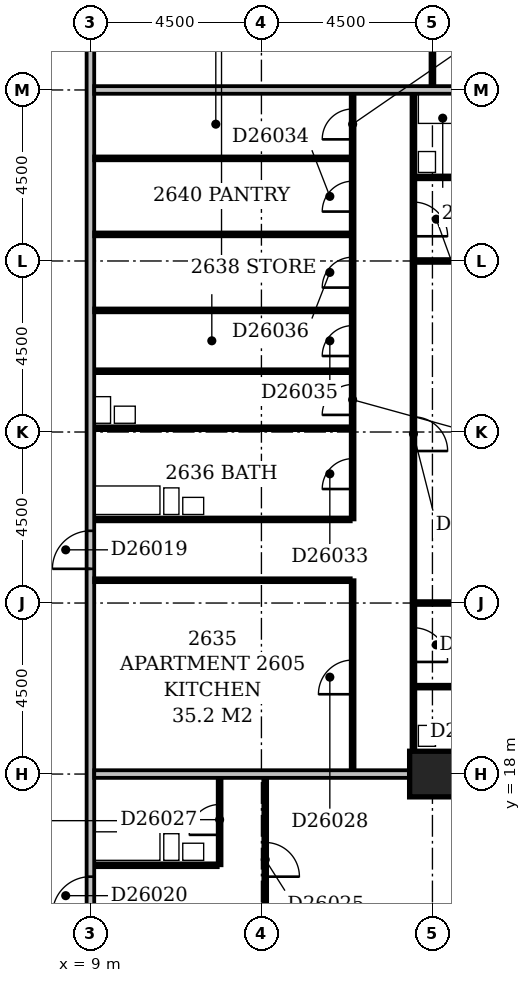
"""IFC4 building model, lengths in metres.
Left out: names, types, materials, properties, quantities, classifications, styles, units other than length and angle.
Written with IfcOpenShell. Run it as: python <this file> out.ifc"""

import sys

from ifc_helpers import new_model, si_unit, direction, frame, frame_2d, origin, origin_2d, place, context, subcontext, project, spatial, rectangle, extrude, element, fill, save


model = new_model("IFC4")
c1 = context("Model", 3, precision=1e-05, world=origin(), true_north=direction((0.0, 1.0)))
c2 = subcontext(c1, "Body", "Model", "MODEL_VIEW")
j1 = project(units=[si_unit("LENGTHUNIT", "METRE"), si_unit("PLANEANGLEUNIT", "RADIAN")], contexts=[c1])
p1 = place(None, origin())
s1 = spatial("IfcSite", under=j1, at=p1, CompositionType="ELEMENT")
p2 = place(p1, origin())
s2 = spatial("IfcBuilding", under=s1, at=p2, CompositionType="ELEMENT")
p3 = place(p2, frame((0.0, 0.0, 104.6)))
s3 = spatial("IfcBuildingStorey", under=s2, at=p3, CompositionType="ELEMENT", Elevation=104.6)
p4 = place(p3, frame((18.0, 18.0, -0.3), z_axis=(0.0, 0.0, 1.0), x_axis=(1.0, 0.0, 0.0)))
e1 = element("IfcColumn", 1, at=p4, inside=s3, PredefinedType="COLUMN", context=c2, shape_type="SweptSolid", body=[
    extrude(rectangle(XDim=1.2, YDim=1.2, at=origin_2d()), origin(), (0.0, 0.0, 1.0), 3.45),
])
p5 = place(p3, frame((9.0, 5.0, 0.0), z_axis=(0.0, 0.0, 1.0), x_axis=(0.0, 1.0, 0.0)))
e2 = element("IfcWall", 2, at=p5, inside=s3, PredefinedType="PARTITIONING", context=c2, shape_type="SweptSolid", body=[
    extrude(rectangle(XDim=44.5, YDim=0.2, at=frame_2d((22.25, 0.0))), origin(), (0.0, 0.0, 1.0), 3.15),
])
p6 = place(p5, frame((18.4, 0.0, 0.0)))
e3 = element("IfcOpeningElement", 3, at=p6, cuts=e2, PredefinedType="OPENING", context=c2, shape_type="SweptSolid", body=[
    extrude(rectangle(XDim=1.0, YDim=2.1, at=frame_2d((0.5, 1.05))), frame((0.0, 0.112, 0.0), z_axis=(0.0, -1.0, 0.0), x_axis=(1.0, 0.0, 0.0)), (0.0, 0.0, 1.0), 0.224),
])
p7 = place(p5, frame((9.3, 0.0, 0.0)))
e4 = element("IfcOpeningElement", 4, at=p7, cuts=e2, PredefinedType="OPENING", context=c2, shape_type="SweptSolid", body=[
    extrude(rectangle(XDim=1.0, YDim=2.1, at=frame_2d((0.5, 1.05))), frame((0.0, 0.112, 0.0), z_axis=(0.0, -1.0, 0.0), x_axis=(1.0, 0.0, 0.0)), (0.0, 0.0, 1.0), 0.224),
])
p8 = place(p5, frame((37.25, 0.0, 0.0)))
e5 = element("IfcOpeningElement", 5, at=p8, cuts=e2, PredefinedType="OPENING", context=c2, shape_type="SweptSolid", body=[
    extrude(rectangle(XDim=0.9, YDim=2.1, at=frame_2d((0.45, 1.05))), frame((0.0, 0.112, 0.0), z_axis=(0.0, -1.0, 0.0), x_axis=(1.0, 0.0, 0.0)), (0.0, 0.0, 1.0), 0.224),
])
p9 = place(p5, frame((1.5, 0.0, 0.0)))
e6 = element("IfcOpeningElement", 6, at=p9, cuts=e2, PredefinedType="OPENING", context=c2, shape_type="SweptSolid", body=[
    extrude(rectangle(XDim=0.9, YDim=2.1, at=frame_2d((0.45, 1.05))), frame((0.0, 0.112, 0.0), z_axis=(0.0, -1.0, 0.0), x_axis=(1.0, 0.0, 0.0)), (0.0, 0.0, 1.0), 0.224),
])
p10 = place(p3, frame((13.6, 9.6, 0.0), z_axis=(0.0, 0.0, 1.0), x_axis=(0.0, 1.0, 0.0)))
e7 = element("IfcWall", 7, at=p10, inside=s3, PredefinedType="PARTITIONING", context=c2, shape_type="SweptSolid", body=[
    extrude(rectangle(XDim=8.3, YDim=0.1, at=frame_2d((4.15, 0.0))), origin(), (0.0, 0.0, 1.0), 3.15),
])
p11 = place(p10, frame((1.2, 0.0, 0.0)))
e8 = element("IfcOpeningElement", 8, at=p11, cuts=e7, PredefinedType="OPENING", context=c2, shape_type="SweptSolid", body=[
    extrude(rectangle(XDim=0.9, YDim=2.1, at=frame_2d((0.45, 1.05))), frame((0.0, 0.062, 0.0), z_axis=(0.0, -1.0, 0.0), x_axis=(1.0, 0.0, 0.0)), (0.0, 0.0, 1.0), 0.124),
])
p12 = place(p10, frame((5.7, 0.0, 0.0)))
e9 = element("IfcOpeningElement", 9, at=p12, cuts=e7, PredefinedType="OPENING", context=c2, shape_type="SweptSolid", body=[
    extrude(rectangle(XDim=0.9, YDim=2.1, at=frame_2d((0.45, 1.05))), frame((0.0, 0.062, 0.0), z_axis=(0.0, -1.0, 0.0), x_axis=(1.0, 0.0, 0.0)), (0.0, 0.0, 1.0), 0.124),
])
p13 = place(p3, frame((9.1, 15.6, 0.0), z_axis=(0.0, 0.0, 1.0), x_axis=(1.0, 0.0, 0.0)))
e10 = element("IfcWall", 10, at=p13, inside=s3, PredefinedType="PLUMBINGWALL", context=c2, shape_type="SweptSolid", body=[
    extrude(rectangle(XDim=3.25, YDim=0.1, at=frame_2d((1.625, 0.0))), origin(), (0.0, 0.0, 1.0), 3.15),
])
p14 = place(p3, frame((12.4, 15.6, 0.0), z_axis=(0.0, 0.0, 1.0), x_axis=(0.0, 1.0, 0.0)))
e11 = element("IfcWall", 11, at=p14, inside=s3, PredefinedType="PARTITIONING", context=c2, shape_type="SweptSolid", body=[
    extrude(rectangle(XDim=2.3, YDim=0.1, at=frame_2d((1.15, 0.0))), origin(), (0.0, 0.0, 1.0), 3.15),
])
p15 = place(p14, frame((0.8, 0.0, 0.0)))
e12 = element("IfcOpeningElement", 12, at=p15, cuts=e11, PredefinedType="OPENING", context=c2, shape_type="SweptSolid", body=[
    extrude(rectangle(XDim=0.8, YDim=2.1, at=frame_2d((0.4, 1.05))), frame((0.0, 0.062, 0.0), z_axis=(0.0, -1.0, 0.0), x_axis=(1.0, 0.0, 0.0)), (0.0, 0.0, 1.0), 0.124),
])
p16 = place(p3, frame((9.1, 18.0, 0.0), z_axis=(0.0, 0.0, 1.0), x_axis=(1.0, 0.0, 0.0)))
e13 = element("IfcWall", 13, at=p16, inside=s3, PredefinedType="PARTITIONING", context=c2, shape_type="SweptSolid", body=[
    extrude(rectangle(XDim=8.3, YDim=0.2, at=frame_2d((4.15, 0.0))), origin(), (0.0, 0.0, 1.0), 2.45),
])
p17 = place(p3, frame((15.9, 18.1, 0.0), z_axis=(0.0, 0.0, 1.0), x_axis=(0.0, 1.0, 0.0)))
e14 = element("IfcWall", 14, at=p17, inside=s3, PredefinedType="PARTITIONING", context=c2, shape_type="SweptSolid", body=[
    extrude(rectangle(XDim=5.0, YDim=0.1, at=frame_2d((2.5, 0.0))), origin(), (0.0, 0.0, 1.0), 3.15),
])
p18 = place(p17, frame((2.0, 0.0, 0.0)))
e15 = element("IfcOpeningElement", 15, at=p18, cuts=e14, PredefinedType="OPENING", context=c2, shape_type="SweptSolid", body=[
    extrude(rectangle(XDim=0.9, YDim=2.1, at=frame_2d((0.45, 1.05))), frame((0.0, 0.062, 0.0), z_axis=(0.0, -1.0, 0.0), x_axis=(1.0, 0.0, 0.0)), (0.0, 0.0, 1.0), 0.124),
])
p19 = place(p3, frame((17.5, 18.1, 0.0), z_axis=(0.0, 0.0, 1.0), x_axis=(0.0, 1.0, 0.0)))
e16 = element("IfcWall", 16, at=p19, inside=s3, PredefinedType="PARTITIONING", context=c2, shape_type="SweptSolid", body=[
    extrude(rectangle(XDim=17.8, YDim=0.1, at=frame_2d((8.9, 0.0))), origin(), (0.0, 0.0, 1.0), 3.15),
])
p20 = place(p19, frame((2.85, 0.0, 0.0)))
e17 = element("IfcOpeningElement", 17, at=p20, cuts=e16, PredefinedType="OPENING", context=c2, shape_type="SweptSolid", body=[
    extrude(rectangle(XDim=0.9, YDim=2.1, at=frame_2d((0.45, 1.05))), frame((0.0, 0.062, 0.0), z_axis=(0.0, -1.0, 0.0), x_axis=(1.0, 0.0, 0.0)), (0.0, 0.0, 1.0), 0.124),
])
p21 = place(p19, frame((8.4, 0.0, 0.0)))
e18 = element("IfcOpeningElement", 18, at=p21, cuts=e16, PredefinedType="OPENING", context=c2, shape_type="SweptSolid", body=[
    extrude(rectangle(XDim=0.9, YDim=2.1, at=frame_2d((0.45, 1.05))), frame((0.0, 0.062, 0.0), z_axis=(0.0, -1.0, 0.0), x_axis=(1.0, 0.0, 0.0)), (0.0, 0.0, 1.0), 0.124),
])
p22 = place(p19, frame((14.05, 0.0, 0.0)))
e19 = element("IfcOpeningElement", 19, at=p22, cuts=e16, PredefinedType="OPENING", context=c2, shape_type="SweptSolid", body=[
    extrude(rectangle(XDim=0.9, YDim=2.1, at=frame_2d((0.45, 1.05))), frame((0.0, 0.062, 0.0), z_axis=(0.0, -1.0, 0.0), x_axis=(1.0, 0.0, 0.0)), (0.0, 0.0, 1.0), 0.124),
])
p23 = place(p3, frame((17.55, 20.3, 0.0), z_axis=(0.0, 0.0, 1.0), x_axis=(1.0, 0.0, 0.0)))
e20 = element("IfcWall", 20, at=p23, inside=s3, PredefinedType="PLUMBINGWALL", context=c2, shape_type="SweptSolid", body=[
    extrude(rectangle(XDim=4.0, YDim=0.1, at=frame_2d((2.0, 0.0))), origin(), (0.0, 0.0, 1.0), 3.15),
])
p24 = place(p23, frame((1.0, 0.0, 0.0)))
e21 = element("IfcOpeningElement", 21, at=p24, cuts=e20, PredefinedType="OPENING", context=c2, shape_type="SweptSolid", body=[
    extrude(rectangle(XDim=0.8, YDim=2.1, at=frame_2d((0.4, 1.05))), frame((0.0, 0.062, 0.0), z_axis=(0.0, -1.0, 0.0), x_axis=(1.0, 0.0, 0.0)), (0.0, 0.0, 1.0), 0.124),
])
p25 = place(p3, frame((17.55, 22.5, 0.0), z_axis=(0.0, 0.0, 1.0), x_axis=(1.0, 0.0, 0.0)))
e22 = element("IfcWall", 22, at=p25, inside=s3, PredefinedType="PARTITIONING", context=c2, shape_type="SweptSolid", body=[
    extrude(rectangle(XDim=4.35, YDim=0.1, at=frame_2d((2.175, 0.0))), origin(), (0.0, 0.0, 1.0), 3.15),
])
p26 = place(p3, frame((9.1, 23.1, 0.0), z_axis=(0.0, 0.0, 1.0), x_axis=(1.0, 0.0, 0.0)))
e23 = element("IfcWall", 23, at=p26, inside=s3, PredefinedType="PARTITIONING", context=c2, shape_type="SweptSolid", body=[
    extrude(rectangle(XDim=6.75, YDim=0.1, at=frame_2d((3.375, 0.0))), origin(), (0.0, 0.0, 1.0), 3.15),
])
p27 = place(p3, frame((9.1, 24.7, 0.0), z_axis=(0.0, 0.0, 1.0), x_axis=(1.0, 0.0, 0.0)))
e24 = element("IfcWall", 24, at=p27, inside=s3, PredefinedType="PLUMBINGWALL", context=c2, shape_type="SweptSolid", body=[
    extrude(rectangle(XDim=6.75, YDim=0.1, at=frame_2d((3.375, 0.0))), origin(), (0.0, 0.0, 1.0), 3.15),
])
p28 = place(p3, frame((15.9, 24.7, 0.0), z_axis=(0.0, 0.0, 1.0), x_axis=(0.0, 1.0, 0.0)))
e25 = element("IfcWall", 25, at=p28, inside=s3, PredefinedType="PARTITIONING", context=c2, shape_type="SweptSolid", body=[
    extrude(rectangle(XDim=11.2, YDim=0.1, at=frame_2d((5.6, 0.0))), origin(), (0.0, 0.0, 1.0), 3.15),
])
p29 = place(p28, frame((0.8, 0.0, 0.0)))
e26 = element("IfcOpeningElement", 26, at=p29, cuts=e25, PredefinedType="OPENING", context=c2, shape_type="SweptSolid", body=[
    extrude(rectangle(XDim=0.8, YDim=2.1, at=frame_2d((0.4, 1.05))), frame((0.0, 0.062, 0.0), z_axis=(0.0, -1.0, 0.0), x_axis=(1.0, 0.0, 0.0)), (0.0, 0.0, 1.0), 0.124),
])
p30 = place(p28, frame((8.1, 0.0, 0.0)))
e27 = element("IfcOpeningElement", 27, at=p30, cuts=e25, PredefinedType="OPENING", context=c2, shape_type="SweptSolid", body=[
    extrude(rectangle(XDim=0.8, YDim=2.1, at=frame_2d((0.4, 1.05))), frame((0.0, 0.062, 0.0), z_axis=(0.0, -1.0, 0.0), x_axis=(1.0, 0.0, 0.0)), (0.0, 0.0, 1.0), 0.124),
])
p31 = place(p28, frame((4.3, 0.0, 0.0)))
e28 = element("IfcOpeningElement", 28, at=p31, cuts=e25, PredefinedType="OPENING", context=c2, shape_type="SweptSolid", body=[
    extrude(rectangle(XDim=0.8, YDim=2.1, at=frame_2d((0.4, 1.05))), frame((0.0, 0.062, 0.0), z_axis=(0.0, -1.0, 0.0), x_axis=(1.0, 0.0, 0.0)), (0.0, 0.0, 1.0), 0.124),
])
p32 = place(p28, frame((6.1, 0.0, 0.0)))
e29 = element("IfcOpeningElement", 29, at=p32, cuts=e25, PredefinedType="OPENING", context=c2, shape_type="SweptSolid", body=[
    extrude(rectangle(XDim=0.8, YDim=2.1, at=frame_2d((0.4, 1.05))), frame((0.0, 0.062, 0.0), z_axis=(0.0, -1.0, 0.0), x_axis=(1.0, 0.0, 0.0)), (0.0, 0.0, 1.0), 0.124),
])
p33 = place(p28, frame((10.0, 0.0, 0.0)))
e30 = element("IfcOpeningElement", 30, at=p33, cuts=e25, PredefinedType="OPENING", context=c2, shape_type="SweptSolid", body=[
    extrude(rectangle(XDim=0.8, YDim=2.1, at=frame_2d((0.4, 1.05))), frame((0.0, 0.062, 0.0), z_axis=(0.0, -1.0, 0.0), x_axis=(1.0, 0.0, 0.0)), (0.0, 0.0, 1.0), 0.124),
])
p34 = place(p28, frame((2.75, 0.0, 0.0)))
e31 = element("IfcOpeningElement", 31, at=p34, cuts=e25, PredefinedType="OPENING", context=c2, shape_type="SweptSolid", body=[
    extrude(rectangle(XDim=0.8, YDim=2.1, at=frame_2d((0.4, 1.05))), frame((0.0, 0.062, 0.0), z_axis=(0.0, -1.0, 0.0), x_axis=(1.0, 0.0, 0.0)), (0.0, 0.0, 1.0), 0.124),
])
p35 = place(p3, frame((9.1, 27.1, 0.0), z_axis=(0.0, 0.0, 1.0), x_axis=(1.0, 0.0, 0.0)))
e32 = element("IfcWall", 32, at=p35, inside=s3, PredefinedType="PLUMBINGWALL", context=c2, shape_type="SweptSolid", body=[
    extrude(rectangle(XDim=6.75, YDim=0.1, at=frame_2d((3.375, 0.0))), origin(), (0.0, 0.0, 1.0), 2.55),
])
p36 = place(p3, frame((9.1, 28.6, 0.0), z_axis=(0.0, 0.0, 1.0), x_axis=(1.0, 0.0, 0.0)))
e33 = element("IfcWall", 33, at=p36, inside=s3, PredefinedType="PLUMBINGWALL", context=c2, shape_type="SweptSolid", body=[
    extrude(rectangle(XDim=6.75, YDim=0.1, at=frame_2d((3.375, 0.0))), origin(), (0.0, 0.0, 1.0), 3.15),
])
p37 = place(p3, frame((9.1, 30.2, 0.0), z_axis=(0.0, 0.0, 1.0), x_axis=(1.0, 0.0, 0.0)))
e34 = element("IfcWall", 34, at=p37, inside=s3, PredefinedType="PARTITIONING", context=c2, shape_type="SweptSolid", body=[
    extrude(rectangle(XDim=6.75, YDim=0.1, at=frame_2d((3.375, 0.0))), origin(), (0.0, 0.0, 1.0), 3.15),
])
p38 = place(p3, frame((17.55, 31.5, 0.0), z_axis=(0.0, 0.0, 1.0), x_axis=(1.0, 0.0, 0.0)))
e35 = element("IfcWall", 35, at=p38, inside=s3, PredefinedType="PARTITIONING", context=c2, shape_type="SweptSolid", body=[
    extrude(rectangle(XDim=4.35, YDim=0.1, at=frame_2d((2.175, 0.0))), origin(), (0.0, 0.0, 1.0), 3.15),
])
p39 = place(p3, frame((9.1, 32.2, 0.0), z_axis=(0.0, 0.0, 1.0), x_axis=(1.0, 0.0, 0.0)))
e36 = element("IfcWall", 36, at=p39, inside=s3, PredefinedType="PARTITIONING", context=c2, shape_type="SweptSolid", body=[
    extrude(rectangle(XDim=6.75, YDim=0.1, at=frame_2d((3.375, 0.0))), origin(), (0.0, 0.0, 1.0), 3.15),
])
p40 = place(p3, frame((17.55, 33.7, 0.0), z_axis=(0.0, 0.0, 1.0), x_axis=(1.0, 0.0, 0.0)))
e37 = element("IfcWall", 37, at=p40, inside=s3, PredefinedType="PLUMBINGWALL", context=c2, shape_type="SweptSolid", body=[
    extrude(rectangle(XDim=2.8, YDim=0.1, at=frame_2d((1.4, 0.0))), origin(), (0.0, 0.0, 1.0), 3.15),
])
p41 = place(p40, frame((1.0, 0.0, 0.0)))
e38 = element("IfcOpeningElement", 38, at=p41, cuts=e37, PredefinedType="OPENING", context=c2, shape_type="SweptSolid", body=[
    extrude(rectangle(XDim=0.8, YDim=2.1, at=frame_2d((0.4, 1.05))), frame((0.0, 0.062, 0.0), z_axis=(0.0, -1.0, 0.0), x_axis=(1.0, 0.0, 0.0)), (0.0, 0.0, 1.0), 0.124),
])
p42 = place(p3, frame((9.1, 34.2, 0.0), z_axis=(0.0, 0.0, 1.0), x_axis=(1.0, 0.0, 0.0)))
e39 = element("IfcWall", 39, at=p42, inside=s3, PredefinedType="PARTITIONING", context=c2, shape_type="SweptSolid", body=[
    extrude(rectangle(XDim=6.75, YDim=0.1, at=frame_2d((3.375, 0.0))), origin(), (0.0, 0.0, 1.0), 3.15),
])
p43 = place(p3, frame((9.1, 36.0, 0.0), z_axis=(0.0, 0.0, 1.0), x_axis=(1.0, 0.0, 0.0)))
e40 = element("IfcWall", 40, at=p43, inside=s3, PredefinedType="PARTITIONING", context=c2, shape_type="SweptSolid", body=[
    extrude(rectangle(XDim=12.8, YDim=0.2, at=frame_2d((6.4, 0.0))), origin(), (0.0, 0.0, 1.0), 2.25),
])
p44 = place(p3, frame((18.0, 36.1, 0.0), z_axis=(0.0, 0.0, 1.0), x_axis=(0.0, 1.0, 0.0)))
e41 = element("IfcWall", 41, at=p44, inside=s3, PredefinedType="PARTITIONING", context=c2, shape_type="SweptSolid", body=[
    extrude(rectangle(XDim=13.3, YDim=0.1, at=frame_2d((6.65, 0.0))), origin(), (0.0, 0.0, 1.0), 3.15),
])
p45 = place(p6, origin())
e42 = element("IfcDoor", 42, at=p45, inside=s3, OperationType="SINGLE_SWING_LEFT", PredefinedType="DOOR", context=c2, shape_type="SweptSolid", body=[
    extrude(rectangle(XDim=1.0, YDim=2.1, at=frame_2d((0.5, 1.05))), frame((0.0, 0.025, 0.0), z_axis=(0.0, -1.0, 0.0), x_axis=(1.0, 0.0, 0.0)), (0.0, 0.0, 1.0), 0.05),
])
fill(e3, e42)
p46 = place(p7, origin())
e43 = element("IfcDoor", 43, at=p46, inside=s3, OperationType="SINGLE_SWING_LEFT", PredefinedType="DOOR", context=c2, shape_type="SweptSolid", body=[
    extrude(rectangle(XDim=1.0, YDim=2.1, at=frame_2d((0.5, 1.05))), frame((0.0, 0.025, 0.0), z_axis=(0.0, -1.0, 0.0), x_axis=(1.0, 0.0, 0.0)), (0.0, 0.0, 1.0), 0.05),
])
fill(e4, e43)
p47 = place(p12, frame((0.9, 0.0, 0.0), z_axis=(0.0, 0.0, 1.0), x_axis=(-1.0, 0.0, 0.0)))
e44 = element("IfcDoor", 44, at=p47, inside=s3, OperationType="SINGLE_SWING_RIGHT", PredefinedType="DOOR", context=c2, shape_type="SweptSolid", body=[
    extrude(rectangle(XDim=0.9, YDim=2.1, at=frame_2d((0.45, 1.05))), frame((0.0, 0.025, 0.0), z_axis=(0.0, -1.0, 0.0), x_axis=(1.0, 0.0, 0.0)), (0.0, 0.0, 1.0), 0.05),
])
fill(e9, e44)
p48 = place(p15, origin())
e45 = element("IfcDoor", 45, at=p48, inside=s3, OperationType="SINGLE_SWING_LEFT", PredefinedType="DOOR", context=c2, shape_type="SweptSolid", body=[
    extrude(rectangle(XDim=0.8, YDim=2.1, at=frame_2d((0.4, 1.05))), frame((0.0, 0.025, 0.0), z_axis=(0.0, -1.0, 0.0), x_axis=(1.0, 0.0, 0.0)), (0.0, 0.0, 1.0), 0.05),
])
fill(e12, e45)
p49 = place(p18, origin())
e46 = element("IfcDoor", 46, at=p49, inside=s3, OperationType="SINGLE_SWING_LEFT", PredefinedType="DOOR", context=c2, shape_type="SweptSolid", body=[
    extrude(rectangle(XDim=0.9, YDim=2.1, at=frame_2d((0.45, 1.05))), frame((0.0, 0.025, 0.0), z_axis=(0.0, -1.0, 0.0), x_axis=(1.0, 0.0, 0.0)), (0.0, 0.0, 1.0), 0.05),
])
fill(e15, e46)
p50 = place(p20, frame((0.9, 0.0, 0.0), z_axis=(0.0, 0.0, 1.0), x_axis=(-1.0, 0.0, 0.0)))
e47 = element("IfcDoor", 47, at=p50, inside=s3, OperationType="SINGLE_SWING_RIGHT", PredefinedType="DOOR", context=c2, shape_type="SweptSolid", body=[
    extrude(rectangle(XDim=0.9, YDim=2.1, at=frame_2d((0.45, 1.05))), frame((0.0, 0.025, 0.0), z_axis=(0.0, -1.0, 0.0), x_axis=(1.0, 0.0, 0.0)), (0.0, 0.0, 1.0), 0.05),
])
fill(e17, e47)
p51 = place(p21, frame((0.9, 0.0, 0.0), z_axis=(0.0, 0.0, 1.0), x_axis=(-1.0, 0.0, 0.0)))
e48 = element("IfcDoor", 48, at=p51, inside=s3, OperationType="SINGLE_SWING_RIGHT", PredefinedType="DOOR", context=c2, shape_type="SweptSolid", body=[
    extrude(rectangle(XDim=0.9, YDim=2.1, at=frame_2d((0.45, 1.05))), frame((0.0, 0.025, 0.0), z_axis=(0.0, -1.0, 0.0), x_axis=(1.0, 0.0, 0.0)), (0.0, 0.0, 1.0), 0.05),
])
fill(e18, e48)
p52 = place(p22, frame((0.9, 0.0, 0.0), z_axis=(0.0, 0.0, 1.0), x_axis=(-1.0, 0.0, 0.0)))
e49 = element("IfcDoor", 49, at=p52, inside=s3, OperationType="SINGLE_SWING_RIGHT", PredefinedType="DOOR", context=c2, shape_type="SweptSolid", body=[
    extrude(rectangle(XDim=0.9, YDim=2.1, at=frame_2d((0.45, 1.05))), frame((0.0, 0.025, 0.0), z_axis=(0.0, -1.0, 0.0), x_axis=(1.0, 0.0, 0.0)), (0.0, 0.0, 1.0), 0.05),
])
fill(e19, e49)
p53 = place(p29, origin())
e50 = element("IfcDoor", 50, at=p53, inside=s3, OperationType="SINGLE_SWING_LEFT", PredefinedType="DOOR", context=c2, shape_type="SweptSolid", body=[
    extrude(rectangle(XDim=0.8, YDim=2.1, at=frame_2d((0.4, 1.05))), frame((0.0, 0.025, 0.0), z_axis=(0.0, -1.0, 0.0), x_axis=(1.0, 0.0, 0.0)), (0.0, 0.0, 1.0), 0.05),
])
fill(e26, e50)
p54 = place(p30, origin())
e51 = element("IfcDoor", 51, at=p54, inside=s3, OperationType="SINGLE_SWING_LEFT", PredefinedType="DOOR", context=c2, shape_type="SweptSolid", body=[
    extrude(rectangle(XDim=0.8, YDim=2.1, at=frame_2d((0.4, 1.05))), frame((0.0, 0.025, 0.0), z_axis=(0.0, -1.0, 0.0), x_axis=(1.0, 0.0, 0.0)), (0.0, 0.0, 1.0), 0.05),
])
fill(e27, e51)
p55 = place(p31, origin())
e52 = element("IfcDoor", 52, at=p55, inside=s3, OperationType="SINGLE_SWING_LEFT", PredefinedType="DOOR", context=c2, shape_type="SweptSolid", body=[
    extrude(rectangle(XDim=0.8, YDim=2.1, at=frame_2d((0.4, 1.05))), frame((0.0, 0.025, 0.0), z_axis=(0.0, -1.0, 0.0), x_axis=(1.0, 0.0, 0.0)), (0.0, 0.0, 1.0), 0.05),
])
fill(e28, e52)
p56 = place(p32, origin())
e53 = element("IfcDoor", 53, at=p56, inside=s3, OperationType="SINGLE_SWING_LEFT", PredefinedType="DOOR", context=c2, shape_type="SweptSolid", body=[
    extrude(rectangle(XDim=0.8, YDim=2.1, at=frame_2d((0.4, 1.05))), frame((0.0, 0.025, 0.0), z_axis=(0.0, -1.0, 0.0), x_axis=(1.0, 0.0, 0.0)), (0.0, 0.0, 1.0), 0.05),
])
fill(e29, e53)
p57 = place(p33, origin())
e54 = element("IfcDoor", 54, at=p57, inside=s3, OperationType="SINGLE_SWING_LEFT", PredefinedType="DOOR", context=c2, shape_type="SweptSolid", body=[
    extrude(rectangle(XDim=0.8, YDim=2.1, at=frame_2d((0.4, 1.05))), frame((0.0, 0.025, 0.0), z_axis=(0.0, -1.0, 0.0), x_axis=(1.0, 0.0, 0.0)), (0.0, 0.0, 1.0), 0.05),
])
fill(e30, e54)
p58 = place(p34, origin())
e55 = element("IfcDoor", 55, at=p58, inside=s3, OperationType="SINGLE_SWING_LEFT", PredefinedType="DOOR", context=c2, shape_type="SweptSolid", body=[
    extrude(rectangle(XDim=0.8, YDim=2.1, at=frame_2d((0.4, 1.05))), frame((0.0, 0.025, 0.0), z_axis=(0.0, -1.0, 0.0), x_axis=(1.0, 0.0, 0.0)), (0.0, 0.0, 1.0), 0.05),
])
fill(e31, e55)
save(model, sys.argv[1])
